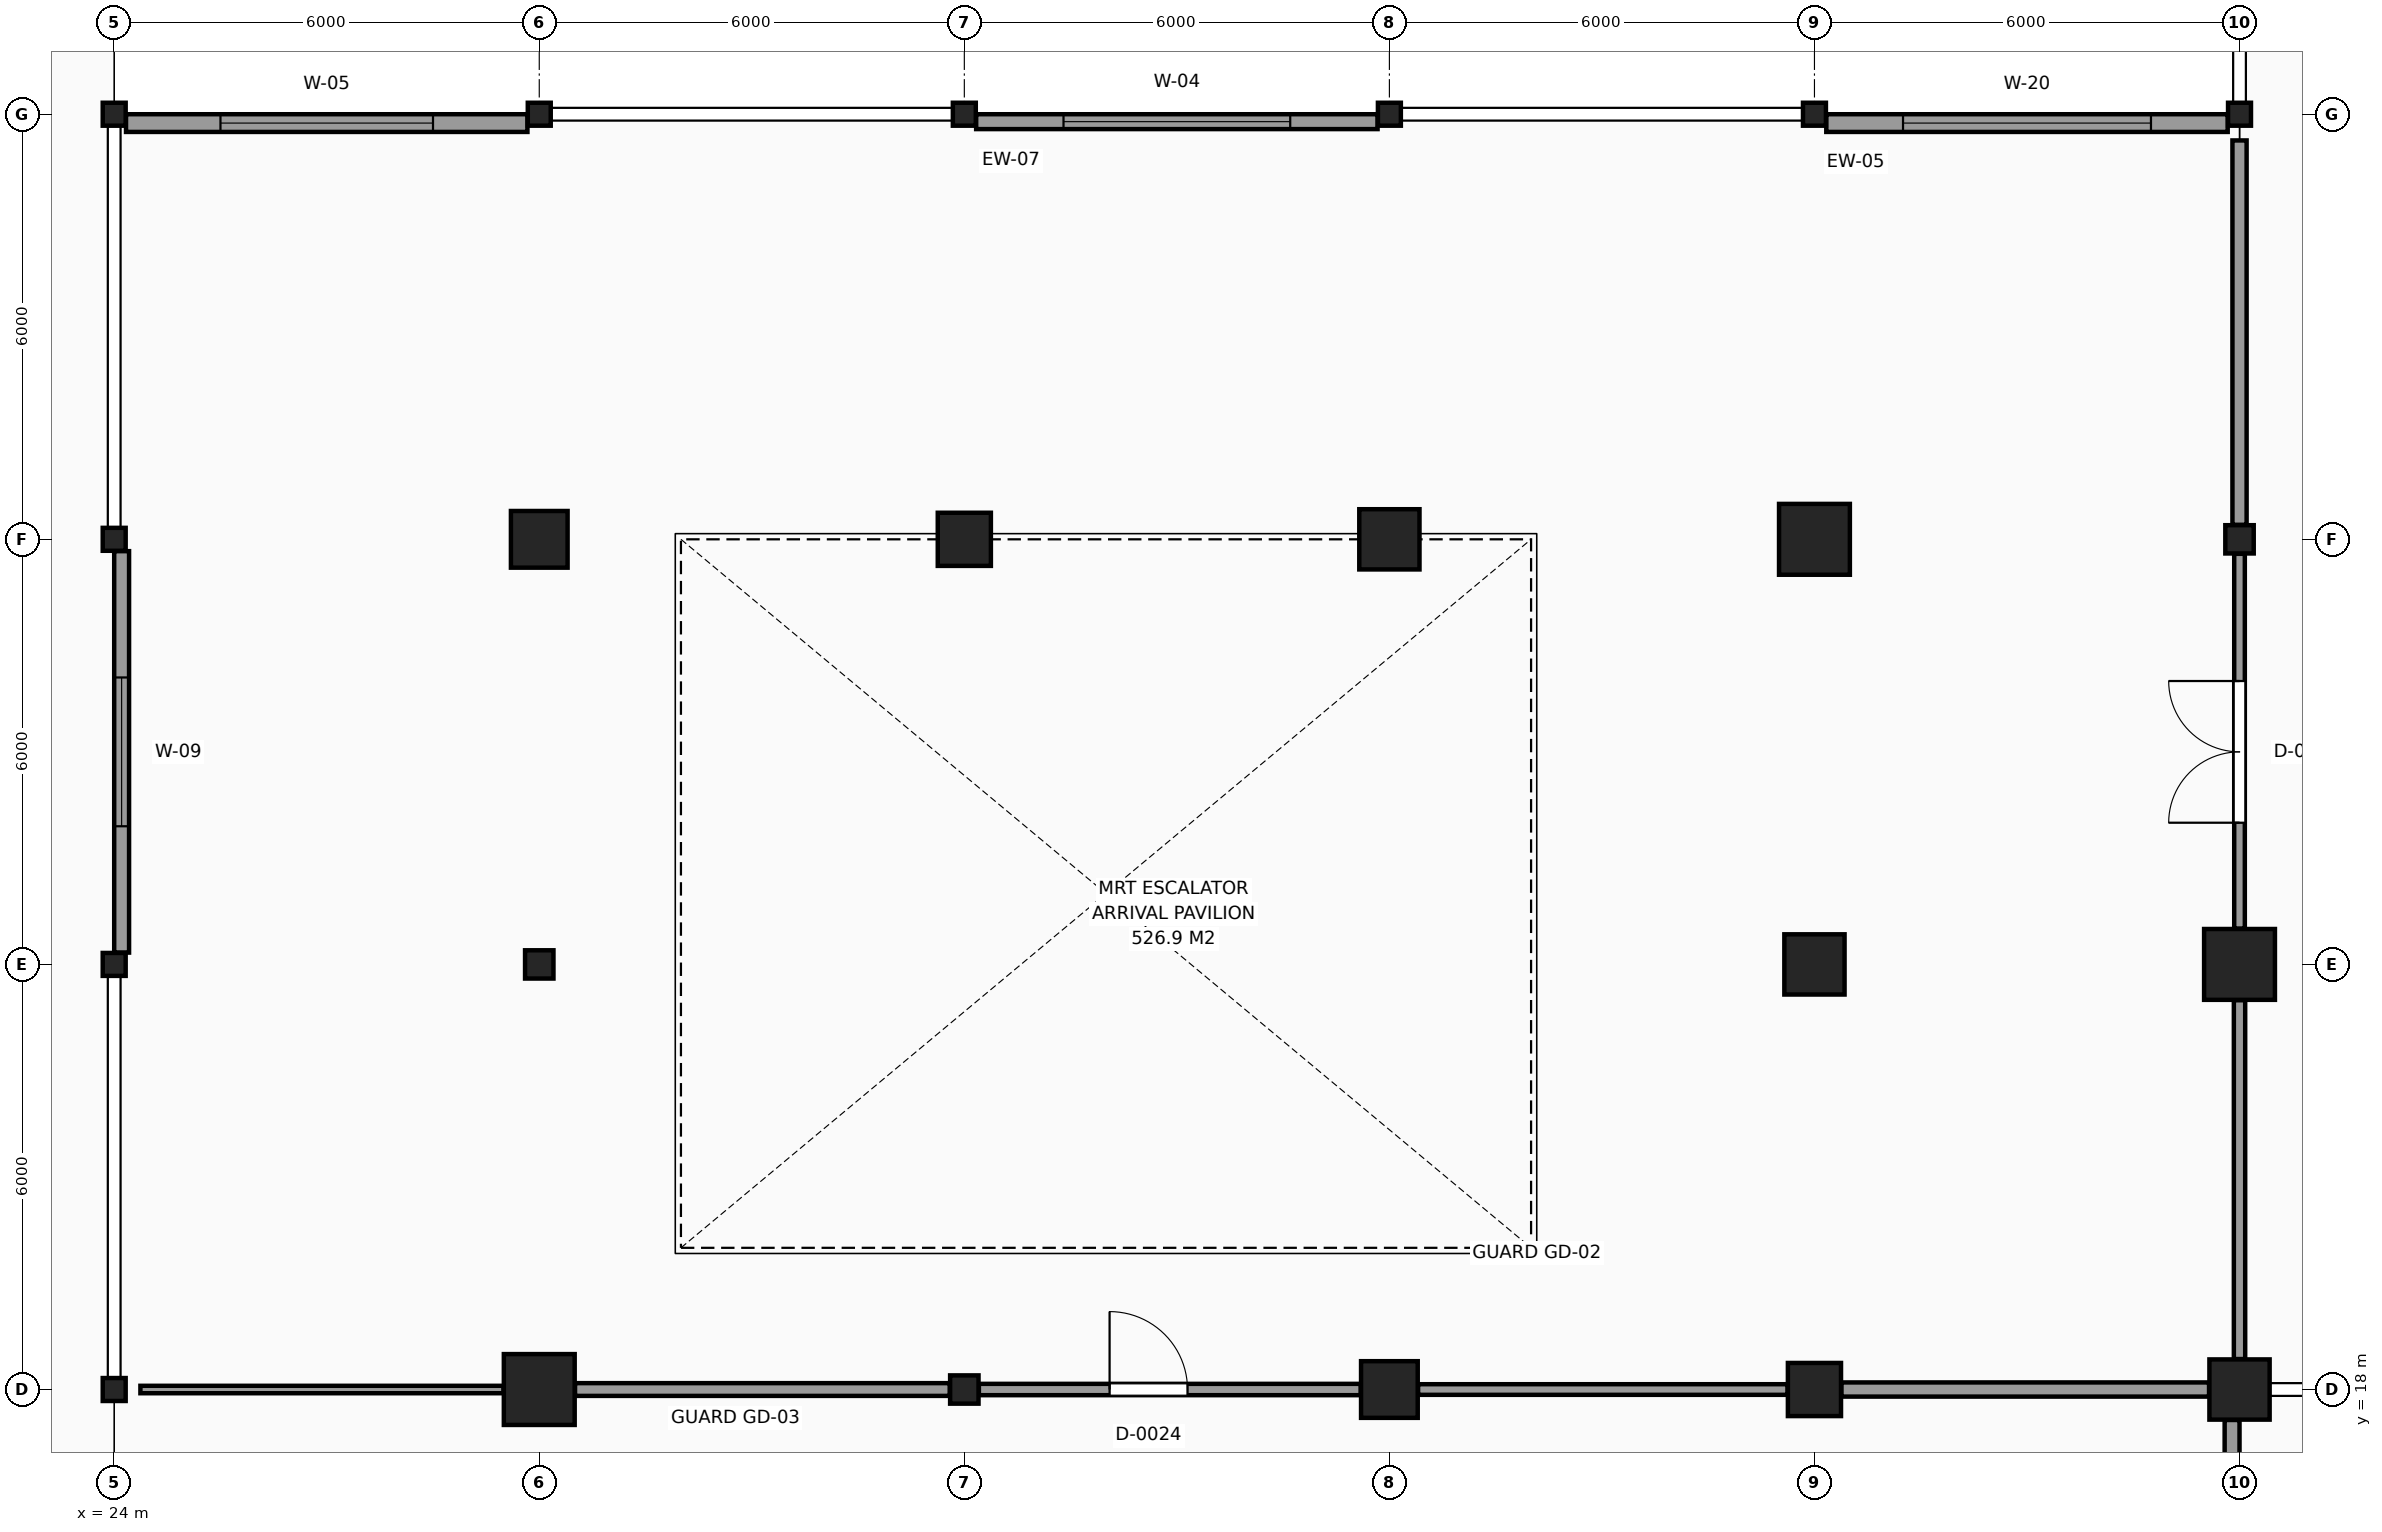
"""IFC4 building model, lengths in metres.
Left out: names, types, materials, properties, quantities, classifications, styles, units other than length and angle.
Written with IfcOpenShell. Run it as: python <this file> out.ifc"""

import sys

from ifc_helpers import new_model, si_unit, direction, frame, frame_2d, origin, origin_2d, place, context, subcontext, project, spatial, rectangle, circle, hollow_circle, i_section, extrude, element, fill, save


model = new_model("IFC4")
c1 = context("Model", 3, precision=1e-05, world=origin(), true_north=direction((0.0, 1.0)))
c2 = subcontext(c1, "Body", "Model", "MODEL_VIEW")
j1 = project(units=[si_unit("LENGTHUNIT", "METRE"), si_unit("PLANEANGLEUNIT", "RADIAN")], contexts=[c1])
p1 = place(None, origin())
s1 = spatial("IfcSite", under=j1, at=p1, CompositionType="ELEMENT")
p2 = place(p1, origin())
s2 = spatial("IfcBuilding", under=s1, at=p2, CompositionType="ELEMENT")
p3 = place(p2, origin())
s3 = spatial("IfcBuildingStorey", under=s2, at=p3, CompositionType="ELEMENT", Elevation=0.0)
for number, where, z_axis, x_axis in (
    (1, (24.0, 18.0, 0.0), (0.0, 0.0, 1.0), (1.0, 0.0, 0.0)),
    (2, (24.0, 24.0, 0.0), (0.0, 0.0, 1.0), (1.0, 0.0, 0.0)),
    (3, (24.0, 30.0, 0.0), (0.0, 0.0, 1.0), (1.0, 0.0, 0.0)),
    (4, (24.0, 36.0, 0.0), (0.0, 0.0, 1.0), (1.0, 0.0, 0.0)),
):
    element("IfcColumn", number, at=place(p3, frame(where, z_axis=z_axis, x_axis=x_axis)), inside=s3, PredefinedType="COLUMN", context=c2, shape_type="SweptSolid", body=[
        extrude(hollow_circle(Radius=0.162, WallThickness=0.016, at=origin_2d()), origin(), (0.0, 0.0, 1.0), 6.0),
    ])
p4 = place(p3, frame((30.0, 18.0, 0.0), z_axis=(0.0, 0.0, 1.0), x_axis=(1.0, 0.0, 0.0)))
e5 = element("IfcColumn", 5, at=p4, inside=s3, PredefinedType="COLUMN", context=c2, shape_type="SweptSolid", body=[
    extrude(circle(Radius=0.5, at=origin_2d()), origin(), (0.0, 0.0, 1.0), 6.0),
])
p5 = place(p3, frame((30.0, 24.0, 0.0), z_axis=(0.0, 0.0, 1.0), x_axis=(1.0, 0.0, 0.0)))
e6 = element("IfcColumn", 6, at=p5, inside=s3, PredefinedType="COLUMN", context=c2, shape_type="SweptSolid", body=[
    extrude(i_section(OverallWidth=0.401, OverallDepth=0.399, WebThickness=0.019, FlangeThickness=0.03, FilletRadius=0.015, at=origin_2d()), origin(), (0.0, 0.0, 1.0), 6.0),
])
p6 = place(p3, frame((30.0, 30.0, 0.0), z_axis=(0.0, 0.0, 1.0), x_axis=(1.0, 0.0, 0.0)))
e7 = element("IfcColumn", 7, at=p6, inside=s3, PredefinedType="COLUMN", context=c2, shape_type="SweptSolid", body=[
    extrude(rectangle(XDim=0.8, YDim=0.8, at=origin_2d()), origin(), (0.0, 0.0, 1.0), 6.0),
])
p7 = place(p3, frame((30.0, 36.0, 0.0), z_axis=(0.0, 0.0, 1.0), x_axis=(1.0, 0.0, 0.0)))
e8 = element("IfcColumn", 8, at=p7, inside=s3, PredefinedType="COLUMN", context=c2, shape_type="SweptSolid", body=[
    extrude(hollow_circle(Radius=0.162, WallThickness=0.016, at=origin_2d()), origin(), (0.0, 0.0, 1.0), 6.0),
])
p8 = place(p3, frame((36.0, 18.0, 0.0), z_axis=(0.0, 0.0, 1.0), x_axis=(1.0, 0.0, 0.0)))
e9 = element("IfcColumn", 9, at=p8, inside=s3, PredefinedType="COLUMN", context=c2, shape_type="SweptSolid", body=[
    extrude(i_section(OverallWidth=0.401, OverallDepth=0.399, WebThickness=0.019, FlangeThickness=0.03, FilletRadius=0.015, at=origin_2d()), origin(), (0.0, 0.0, 1.0), 6.0),
])
p9 = place(p3, frame((36.0, 30.0, 0.0), z_axis=(0.0, 0.0, 1.0), x_axis=(1.0, 0.0, 0.0)))
e10 = element("IfcColumn", 10, at=p9, inside=s3, PredefinedType="COLUMN", context=c2, shape_type="SweptSolid", body=[
    extrude(rectangle(XDim=0.75, YDim=0.75, at=origin_2d()), origin(), (0.0, 0.0, 1.0), 6.0),
])
p10 = place(p3, frame((36.0, 36.0, 0.0), z_axis=(0.0, 0.0, 1.0), x_axis=(1.0, 0.0, 0.0)))
e11 = element("IfcColumn", 11, at=p10, inside=s3, PredefinedType="COLUMN", context=c2, shape_type="SweptSolid", body=[
    extrude(hollow_circle(Radius=0.162, WallThickness=0.016, at=origin_2d()), origin(), (0.0, 0.0, 1.0), 6.0),
])
p11 = place(p3, frame((42.0, 18.0, 0.0), z_axis=(0.0, 0.0, 1.0), x_axis=(1.0, 0.0, 0.0)))
e12 = element("IfcColumn", 12, at=p11, inside=s3, PredefinedType="COLUMN", context=c2, shape_type="SweptSolid", body=[
    extrude(rectangle(XDim=0.8, YDim=0.8, at=origin_2d()), origin(), (0.0, 0.0, 1.0), 6.0),
])
p12 = place(p3, frame((42.0, 30.0, 0.0), z_axis=(0.0, 0.0, 1.0), x_axis=(1.0, 0.0, 0.0)))
e13 = element("IfcColumn", 13, at=p12, inside=s3, PredefinedType="COLUMN", context=c2, shape_type="SweptSolid", body=[
    extrude(circle(Radius=0.425, at=origin_2d()), origin(), (0.0, 0.0, 1.0), 6.0),
])
p13 = place(p3, frame((42.0, 36.0, 0.0), z_axis=(0.0, 0.0, 1.0), x_axis=(1.0, 0.0, 0.0)))
e14 = element("IfcColumn", 14, at=p13, inside=s3, PredefinedType="COLUMN", context=c2, shape_type="SweptSolid", body=[
    extrude(hollow_circle(Radius=0.162, WallThickness=0.016, at=origin_2d()), origin(), (0.0, 0.0, 1.0), 6.0),
])
p14 = place(p3, frame((48.0, 18.0, 0.0), z_axis=(0.0, 0.0, 1.0), x_axis=(1.0, 0.0, 0.0)))
e15 = element("IfcColumn", 15, at=p14, inside=s3, PredefinedType="COLUMN", context=c2, shape_type="SweptSolid", body=[
    extrude(rectangle(XDim=0.75, YDim=0.75, at=origin_2d()), origin(), (0.0, 0.0, 1.0), 6.0),
])
p15 = place(p3, frame((48.0, 24.0, 0.0), z_axis=(0.0, 0.0, 1.0), x_axis=(1.0, 0.0, 0.0)))
e16 = element("IfcColumn", 16, at=p15, inside=s3, PredefinedType="COLUMN", context=c2, shape_type="SweptSolid", body=[
    extrude(circle(Radius=0.425, at=origin_2d()), origin(), (0.0, 0.0, 1.0), 6.0),
])
p16 = place(p3, frame((48.0, 30.0, 0.0), z_axis=(0.0, 0.0, 1.0), x_axis=(1.0, 0.0, 0.0)))
e17 = element("IfcColumn", 17, at=p16, inside=s3, PredefinedType="COLUMN", context=c2, shape_type="SweptSolid", body=[
    extrude(circle(Radius=0.5, at=origin_2d()), origin(), (0.0, 0.0, 1.0), 6.0),
])
p17 = place(p3, frame((48.0, 36.0, 0.0), z_axis=(0.0, 0.0, 1.0), x_axis=(1.0, 0.0, 0.0)))
e18 = element("IfcColumn", 18, at=p17, inside=s3, PredefinedType="COLUMN", context=c2, shape_type="SweptSolid", body=[
    extrude(hollow_circle(Radius=0.162, WallThickness=0.016, at=origin_2d()), origin(), (0.0, 0.0, 1.0), 6.0),
])
p18 = place(p3, frame((54.0, 18.0, 0.0), z_axis=(0.0, 0.0, 1.0), x_axis=(1.0, 0.0, 0.0)))
e19 = element("IfcColumn", 19, at=p18, inside=s3, PredefinedType="COLUMN", context=c2, shape_type="SweptSolid", body=[
    extrude(circle(Radius=0.425, at=origin_2d()), origin(), (0.0, 0.0, 1.0), 6.0),
])
p19 = place(p3, frame((54.0, 24.0, 0.0), z_axis=(0.0, 0.0, 1.0), x_axis=(1.0, 0.0, 0.0)))
e20 = element("IfcColumn", 20, at=p19, inside=s3, PredefinedType="COLUMN", context=c2, shape_type="SweptSolid", body=[
    extrude(circle(Radius=0.5, at=origin_2d()), origin(), (0.0, 0.0, 1.0), 6.0),
])
p20 = place(p3, frame((54.0, 30.0, 0.0), z_axis=(0.0, 0.0, 1.0), x_axis=(1.0, 0.0, 0.0)))
e21 = element("IfcColumn", 21, at=p20, inside=s3, PredefinedType="COLUMN", context=c2, shape_type="SweptSolid", body=[
    extrude(i_section(OverallWidth=0.401, OverallDepth=0.399, WebThickness=0.019, FlangeThickness=0.03, FilletRadius=0.015, at=origin_2d()), origin(), (0.0, 0.0, 1.0), 6.0),
])
p21 = place(p3, frame((54.0, 36.0, 0.0), z_axis=(0.0, 0.0, 1.0), x_axis=(1.0, 0.0, 0.0)))
e22 = element("IfcColumn", 22, at=p21, inside=s3, PredefinedType="COLUMN", context=c2, shape_type="SweptSolid", body=[
    extrude(hollow_circle(Radius=0.162, WallThickness=0.016, at=origin_2d()), origin(), (0.0, 0.0, 1.0), 6.0),
])
p22 = place(p3, frame((53.833, 35.875, 0.0), z_axis=(0.0, 0.0, 1.0), x_axis=(-1.0, 0.0, 0.0)))
e23 = element("IfcWall", 23, at=p22, inside=s3, PredefinedType="SOLIDWALL", context=c2, shape_type="SweptSolid", body=[
    extrude(rectangle(XDim=5.666, YDim=0.25, at=frame_2d((2.833, 0.0))), origin(), (0.0, 0.0, 1.0), 5.74),
])
p23 = place(p22, frame((1.083, 0.0, 0.85)))
e24 = element("IfcOpeningElement", 24, at=p23, cuts=e23, PredefinedType="OPENING", context=c2, shape_type="SweptSolid", body=[
    extrude(rectangle(XDim=3.5, YDim=1.3, at=frame_2d((1.75, 0.65))), frame((0.0, 0.135, 0.0), z_axis=(0.0, -1.0, 0.0), x_axis=(1.0, 0.0, 0.0)), (0.0, 0.0, 1.0), 0.27),
])
p24 = place(p3, frame((41.833, 35.895, 0.0), z_axis=(0.0, 0.0, 1.0), x_axis=(-1.0, 0.0, 0.0)))
e25 = element("IfcWall", 25, at=p24, inside=s3, PredefinedType="SOLIDWALL", context=c2, shape_type="SweptSolid", body=[
    extrude(rectangle(XDim=5.666, YDim=0.21, at=frame_2d((2.833, 0.0))), origin(), (0.0, 0.0, 1.0), 5.74),
])
p25 = place(p24, frame((1.233, 0.0, 0.85)))
e26 = element("IfcOpeningElement", 26, at=p25, cuts=e25, PredefinedType="OPENING", context=c2, shape_type="SweptSolid", body=[
    extrude(rectangle(XDim=3.2, YDim=1.85, at=frame_2d((1.6, 0.925))), frame((0.0, 0.115, 0.0), z_axis=(0.0, -1.0, 0.0), x_axis=(1.0, 0.0, 0.0)), (0.0, 0.0, 1.0), 0.23),
])
p26 = place(p3, frame((29.833, 35.875, 0.0), z_axis=(0.0, 0.0, 1.0), x_axis=(-1.0, 0.0, 0.0)))
e27 = element("IfcWall", 27, at=p26, inside=s3, PredefinedType="SOLIDWALL", context=c2, shape_type="SweptSolid", body=[
    extrude(rectangle(XDim=5.666, YDim=0.25, at=frame_2d((2.833, 0.0))), origin(), (0.0, 0.0, 1.0), 5.74),
])
p27 = place(p26, frame((1.333, 0.0, 0.85)))
e28 = element("IfcOpeningElement", 28, at=p27, cuts=e27, PredefinedType="OPENING", context=c2, shape_type="SweptSolid", body=[
    extrude(rectangle(XDim=3.0, YDim=1.9, at=frame_2d((1.5, 0.95))), frame((0.0, 0.135, 0.0), z_axis=(0.0, -1.0, 0.0), x_axis=(1.0, 0.0, 0.0)), (0.0, 0.0, 1.0), 0.27),
])
p28 = place(p3, frame((24.105, 29.833, 0.0), z_axis=(0.0, 0.0, 1.0), x_axis=(0.0, -1.0, 0.0)))
e29 = element("IfcWall", 29, at=p28, inside=s3, PredefinedType="SOLIDWALL", context=c2, shape_type="SweptSolid", body=[
    extrude(rectangle(XDim=5.666, YDim=0.21, at=frame_2d((2.833, 0.0))), origin(), (0.0, 0.0, 1.0), 5.74),
])
p29 = place(p28, frame((1.783, 0.0, 0.85)))
e30 = element("IfcOpeningElement", 30, at=p29, cuts=e29, PredefinedType="OPENING", context=c2, shape_type="SweptSolid", body=[
    extrude(rectangle(XDim=2.1, YDim=1.7, at=frame_2d((1.05, 0.85))), frame((0.0, 0.115, 0.0), z_axis=(0.0, -1.0, 0.0), x_axis=(1.0, 0.0, 0.0)), (0.0, 0.0, 1.0), 0.23),
])
p30 = place(p3, frame((53.895, 12.167, 0.0), z_axis=(0.0, 0.0, 1.0), x_axis=(0.0, 1.0, 0.0)))
e31 = element("IfcWall", 31, at=p30, inside=s3, PredefinedType="SOLIDWALL", context=c2, shape_type="SweptSolid", body=[
    extrude(rectangle(XDim=5.403, YDim=0.21, at=frame_2d((2.702, 0.0))), origin(), (0.0, 0.0, 1.0), 5.74),
])
p31 = place(p30, frame((2.002, 0.0, 0.85)))
e32 = element("IfcOpeningElement", 32, at=p31, cuts=e31, PredefinedType="OPENING", context=c2, shape_type="SweptSolid", body=[
    extrude(rectangle(XDim=1.4, YDim=1.4, at=frame_2d((0.7, 0.7))), frame((0.0, 0.115, 0.0), z_axis=(0.0, -1.0, 0.0), x_axis=(1.0, 0.0, 0.0)), (0.0, 0.0, 1.0), 0.23),
])
p32 = place(p3, frame((54.0, 18.43, 0.0), z_axis=(0.0, 0.0, 1.0), x_axis=(0.0, 1.0, 0.0)))
e33 = element("IfcWall", 33, at=p32, inside=s3, PredefinedType="PARTITIONING", context=c2, shape_type="SweptSolid", body=[
    extrude(rectangle(XDim=5.065, YDim=0.16, at=frame_2d((2.533, 0.0))), origin(), (0.0, 0.0, 1.0), 5.01),
])
p33 = place(p3, frame((54.0, 24.505, 0.0), z_axis=(0.0, 0.0, 1.0), x_axis=(0.0, 1.0, 0.0)))
e34 = element("IfcWall", 34, at=p33, inside=s3, PredefinedType="PARTITIONING", context=c2, shape_type="SweptSolid", body=[
    extrude(rectangle(XDim=5.291, YDim=0.15, at=frame_2d((2.645, 0.0))), origin(), (0.0, 0.0, 1.0), 4.99),
])
p34 = place(p33, frame((1.495, 0.0, 0.0)))
e35 = element("IfcOpeningElement", 35, at=p34, cuts=e34, PredefinedType="OPENING", context=c2, shape_type="SweptSolid", body=[
    extrude(rectangle(XDim=2.0, YDim=2.45, at=frame_2d((1.0, 1.225))), frame((0.0, 0.085, 0.0), z_axis=(0.0, -1.0, 0.0), x_axis=(1.0, 0.0, 0.0)), (0.0, 0.0, 1.0), 0.17),
])
p35 = place(p3, frame((54.0, 30.205, 0.0), z_axis=(0.0, 0.0, 1.0), x_axis=(0.0, 1.0, 0.0)))
e36 = element("IfcWall", 36, at=p35, inside=s3, PredefinedType="PARTITIONING", context=c2, shape_type="SweptSolid", body=[
    extrude(rectangle(XDim=5.425, YDim=0.2, at=frame_2d((2.713, 0.0))), origin(), (0.0, 0.0, 1.0), 4.99),
])
p36 = place(p3, frame((24.37, 18.0, 0.0), z_axis=(0.0, 0.0, 1.0), x_axis=(1.0, 0.0, 0.0)))
e37 = element("IfcWall", 37, at=p36, inside=s3, PredefinedType="PARTITIONING", context=c2, shape_type="SweptSolid", body=[
    extrude(rectangle(XDim=5.125, YDim=0.105, at=frame_2d((2.562, 0.0))), origin(), (0.0, 0.0, 1.0), 5.74),
])
p37 = place(p3, frame((30.505, 18.0, 0.0), z_axis=(0.0, 0.0, 1.0), x_axis=(1.0, 0.0, 0.0)))
e38 = element("IfcWall", 38, at=p37, inside=s3, PredefinedType="PARTITIONING", context=c2, shape_type="SweptSolid", body=[
    extrude(rectangle(XDim=5.29, YDim=0.18, at=frame_2d((2.645, 0.0))), origin(), (0.0, 0.0, 1.0), 5.74),
])
p38 = place(p3, frame((36.206, 18.0, 0.0), z_axis=(0.0, 0.0, 1.0), x_axis=(1.0, 0.0, 0.0)))
e39 = element("IfcWall", 39, at=p38, inside=s3, PredefinedType="PARTITIONING", context=c2, shape_type="SweptSolid", body=[
    extrude(rectangle(XDim=5.389, YDim=0.16, at=frame_2d((2.695, 0.0))), origin(), (0.0, 0.0, 1.0), 5.74),
])
p39 = place(p38, frame((1.845, 0.0, 0.0)))
e40 = element("IfcOpeningElement", 40, at=p39, cuts=e39, PredefinedType="OPENING", context=c2, shape_type="SweptSolid", body=[
    extrude(rectangle(XDim=1.1, YDim=2.15, at=frame_2d((0.55, 1.075))), frame((0.0, 0.09, 0.0), z_axis=(0.0, -1.0, 0.0), x_axis=(1.0, 0.0, 0.0)), (0.0, 0.0, 1.0), 0.18),
])
p40 = place(p3, frame((42.405, 18.0, 0.0), z_axis=(0.0, 0.0, 1.0), x_axis=(1.0, 0.0, 0.0)))
e41 = element("IfcWall", 41, at=p40, inside=s3, PredefinedType="PARTITIONING", context=c2, shape_type="SweptSolid", body=[
    extrude(rectangle(XDim=5.215, YDim=0.15, at=frame_2d((2.607, 0.0))), origin(), (0.0, 0.0, 1.0), 5.74),
])
p41 = place(p3, frame((48.38, 18.0, 0.0), z_axis=(0.0, 0.0, 1.0), x_axis=(1.0, 0.0, 0.0)))
e42 = element("IfcWall", 42, at=p41, inside=s3, PredefinedType="PARTITIONING", context=c2, shape_type="SweptSolid", body=[
    extrude(rectangle(XDim=5.19, YDim=0.2, at=frame_2d((2.595, 0.0))), origin(), (0.0, 0.0, 1.0), 5.74),
])
p42 = place(p29, origin())
e43 = element("IfcWindow", 43, at=p42, inside=s3, PartitioningType="SINGLE_PANEL", PredefinedType="WINDOW", context=c2, shape_type="SweptSolid", body=[
    extrude(rectangle(XDim=2.1, YDim=1.7, at=frame_2d((1.05, 0.85))), frame((0.0, 0.03, 0.0), z_axis=(0.0, -1.0, 0.0), x_axis=(1.0, 0.0, 0.0)), (0.0, 0.0, 1.0), 0.06),
])
fill(e30, e43)
p43 = place(p23, origin())
e44 = element("IfcWindow", 44, at=p43, inside=s3, PartitioningType="SINGLE_PANEL", PredefinedType="WINDOW", context=c2, shape_type="SweptSolid", body=[
    extrude(rectangle(XDim=3.5, YDim=1.3, at=frame_2d((1.75, 0.65))), frame((0.0, 0.03, 0.0), z_axis=(0.0, -1.0, 0.0), x_axis=(1.0, 0.0, 0.0)), (0.0, 0.0, 1.0), 0.06),
])
fill(e24, e44)
p44 = place(p25, origin())
e45 = element("IfcWindow", 45, at=p44, inside=s3, PartitioningType="SINGLE_PANEL", PredefinedType="WINDOW", context=c2, shape_type="SweptSolid", body=[
    extrude(rectangle(XDim=3.2, YDim=1.85, at=frame_2d((1.6, 0.925))), frame((0.0, 0.03, 0.0), z_axis=(0.0, -1.0, 0.0), x_axis=(1.0, 0.0, 0.0)), (0.0, 0.0, 1.0), 0.06),
])
fill(e26, e45)
p45 = place(p27, origin())
e46 = element("IfcWindow", 46, at=p45, inside=s3, PartitioningType="SINGLE_PANEL", PredefinedType="WINDOW", context=c2, shape_type="SweptSolid", body=[
    extrude(rectangle(XDim=3.0, YDim=1.9, at=frame_2d((1.5, 0.95))), frame((0.0, 0.03, 0.0), z_axis=(0.0, -1.0, 0.0), x_axis=(1.0, 0.0, 0.0)), (0.0, 0.0, 1.0), 0.06),
])
fill(e28, e46)
p46 = place(p39, origin())
e47 = element("IfcDoor", 47, at=p46, inside=s3, OperationType="SINGLE_SWING_LEFT", PredefinedType="DOOR", context=c2, shape_type="SweptSolid", body=[
    extrude(rectangle(XDim=1.1, YDim=2.15, at=frame_2d((0.55, 1.075))), frame((0.0, 0.025, 0.0), z_axis=(0.0, -1.0, 0.0), x_axis=(1.0, 0.0, 0.0)), (0.0, 0.0, 1.0), 0.05),
])
fill(e40, e47)
p47 = place(p34, origin())
e48 = element("IfcDoor", 48, at=p47, inside=s3, OperationType="DOUBLE_DOOR_SINGLE_SWING", PredefinedType="DOOR", context=c2, shape_type="SweptSolid", body=[
    extrude(rectangle(XDim=2.0, YDim=2.45, at=frame_2d((1.0, 1.225))), frame((0.0, 0.025, 0.0), z_axis=(0.0, -1.0, 0.0), x_axis=(1.0, 0.0, 0.0)), (0.0, 0.0, 1.0), 0.05),
])
fill(e35, e48)
save(model, sys.argv[1])
